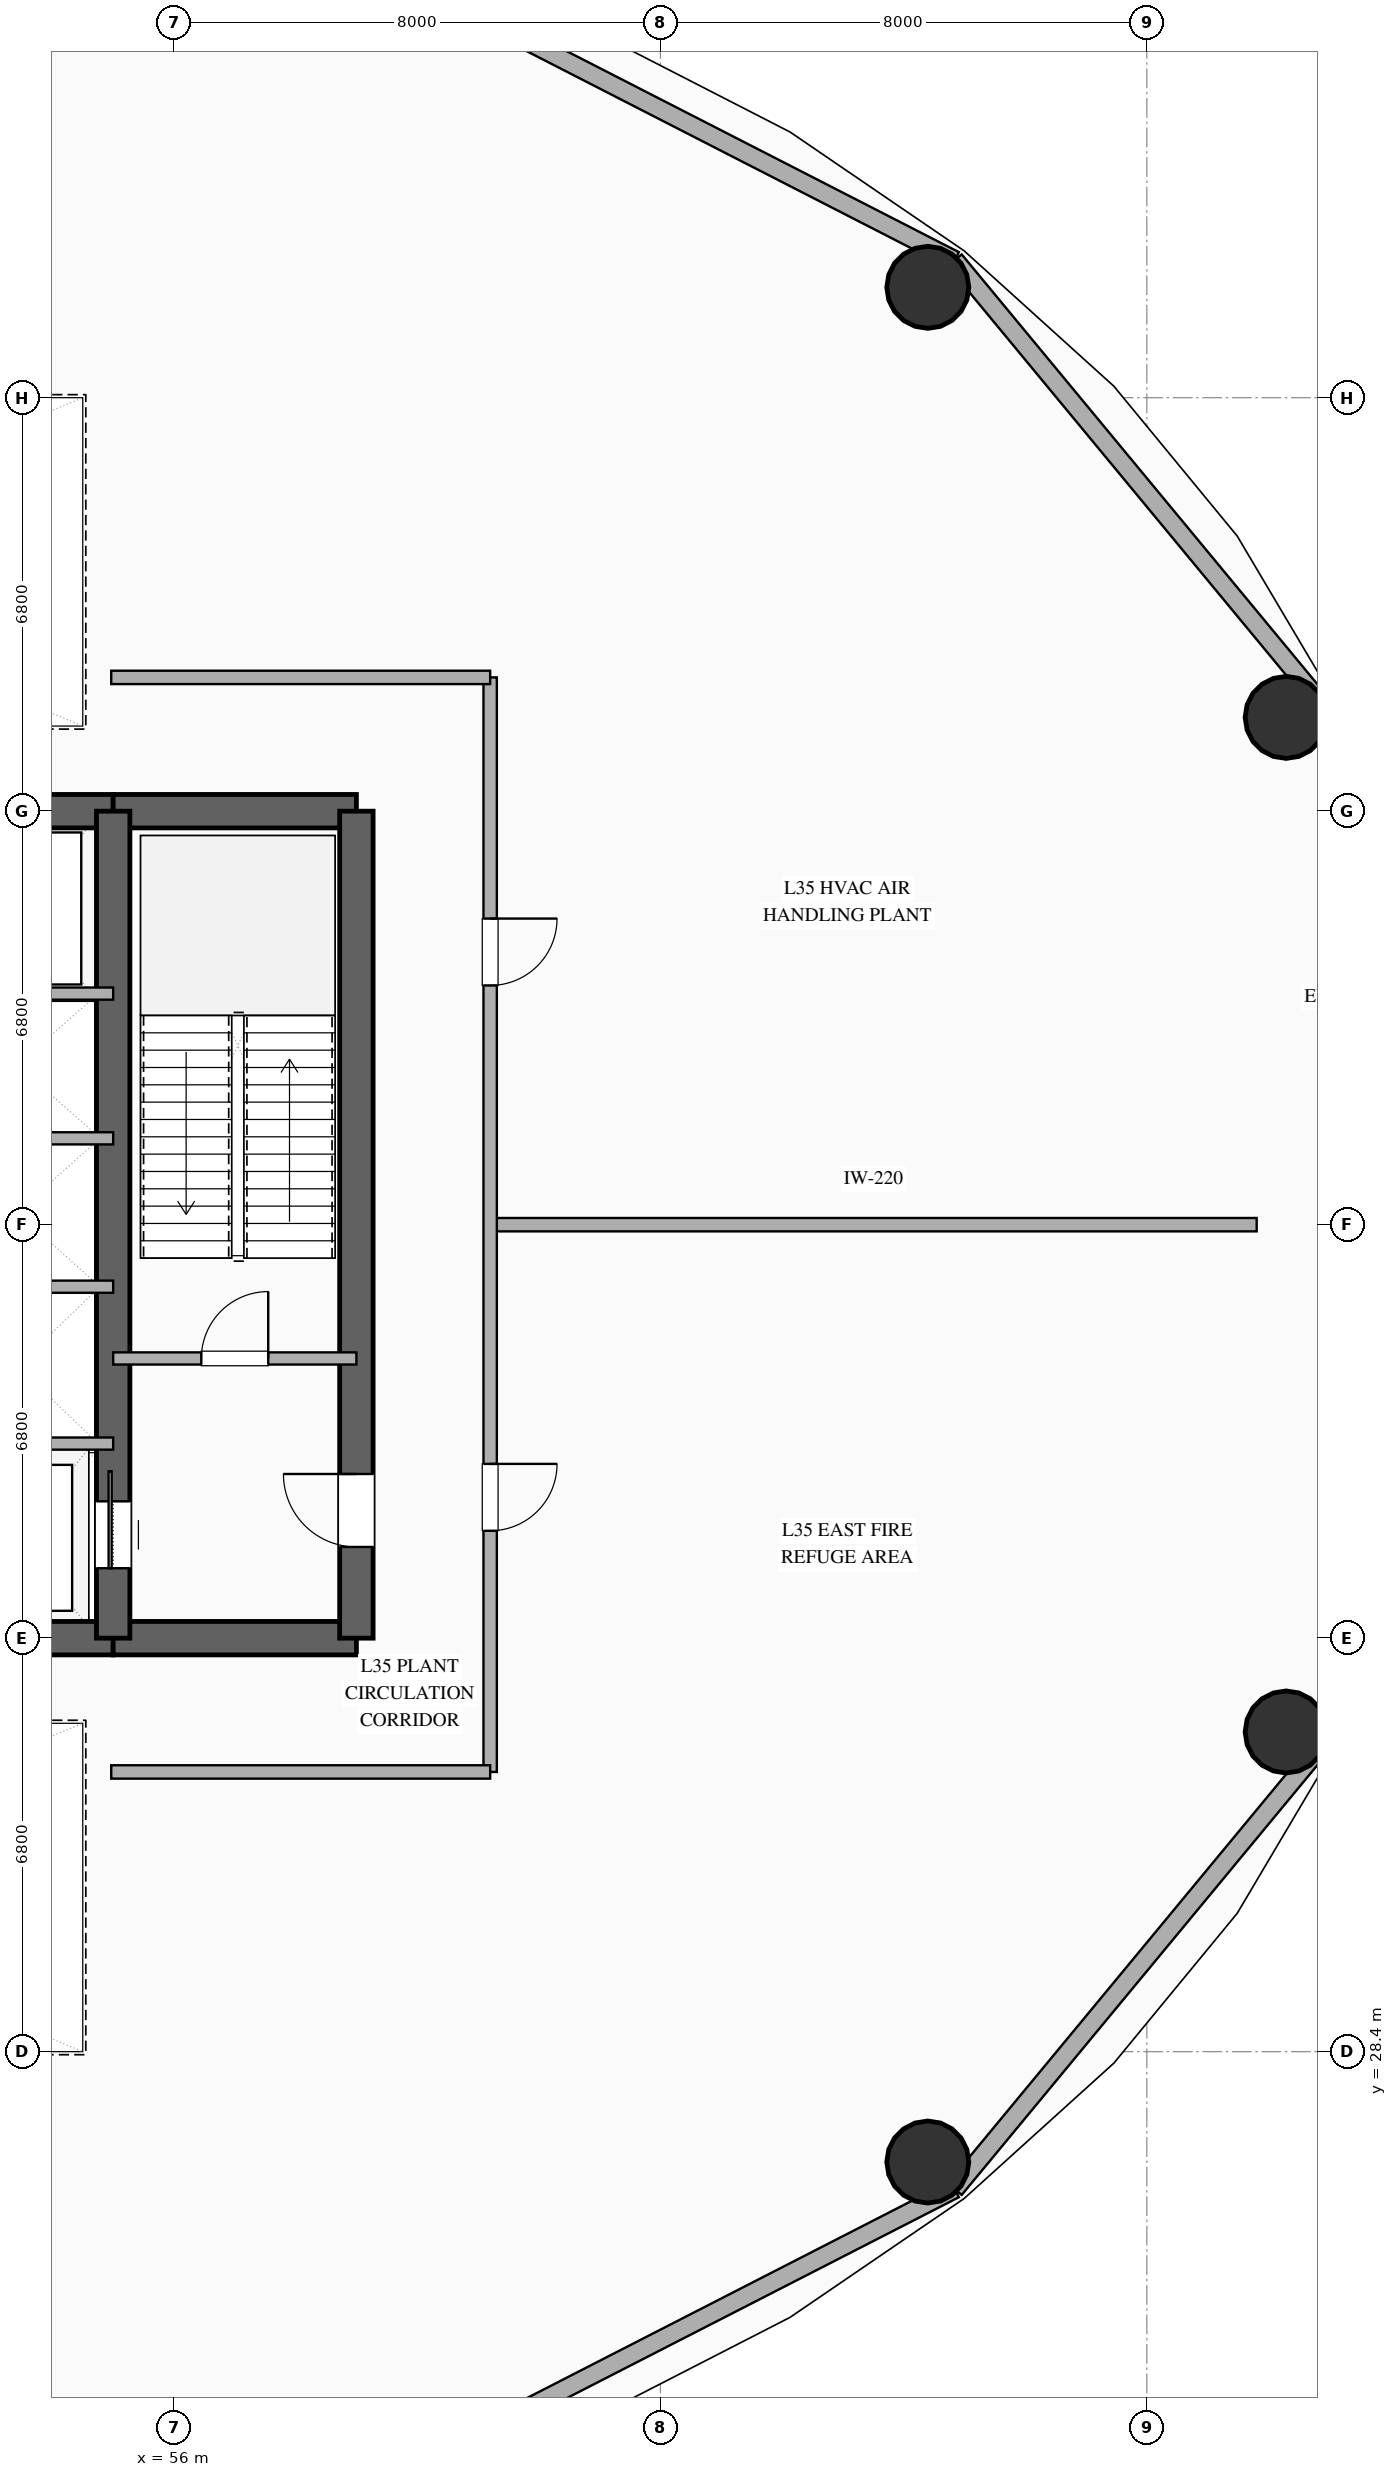
"""IFC4 building model, lengths in metres.
Left out: names, types, materials, properties, quantities, classifications, styles, units other than length and angle.
Written with IfcOpenShell. Run it as: python <this file> out.ifc"""

import sys

from ifc_helpers import new_model, si_unit, direction, frame, frame_2d, origin, origin_2d, place, context, subcontext, project, spatial, rectangle, hollow_circle, extrude, element, fill, save


model = new_model("IFC4")
c1 = context("Model", 3, precision=1e-05, world=origin(), true_north=direction((0.0, 1.0)))
c2 = subcontext(c1, "Body", "Model", "MODEL_VIEW")
j1 = project(units=[si_unit("LENGTHUNIT", "METRE"), si_unit("PLANEANGLEUNIT", "RADIAN")], contexts=[c1])
p1 = place(None, origin())
s1 = spatial("IfcSite", under=j1, at=p1, CompositionType="ELEMENT")
p2 = place(p1, origin())
s2 = spatial("IfcBuilding", under=s1, at=p2, CompositionType="ELEMENT")
p3 = place(p2, frame((0.0, 0.0, 139.8)))
s3 = spatial("IfcBuildingStorey", under=s2, at=p3, CompositionType="ELEMENT", Elevation=139.8)
p4 = place(p3, frame((41.0, 35.2, 0.0), z_axis=(0.0, 0.0, 1.0), x_axis=(1.0, 0.0, 0.0)))
e1 = element("IfcWall", 1, at=p4, inside=s3, PredefinedType="SHEAR", context=c2, shape_type="SweptSolid", body=[
    extrude(rectangle(XDim=14.0, YDim=0.55, at=frame_2d((7.0, 0.0))), origin(), (0.0, 0.0, 1.0), 5.05),
])
p5 = place(p4, frame((6.1, 0.0, 0.0)))
e2 = element("IfcOpeningElement", 2, at=p5, cuts=e1, PredefinedType="OPENING", context=c2, shape_type="SweptSolid", body=[
    extrude(rectangle(XDim=1.8, YDim=2.25, at=frame_2d((0.9, 1.125))), frame((0.0, 0.285, 0.0), z_axis=(0.0, -1.0, 0.0), x_axis=(1.0, 0.0, 0.0)), (0.0, 0.0, 1.0), 0.57),
])
p6 = place(p3, frame((55.0, 35.2, 0.0), z_axis=(0.0, 0.0, 1.0), x_axis=(1.0, 0.0, 0.0)))
e3 = element("IfcWall", 3, at=p6, inside=s3, PredefinedType="SHEAR", context=c2, shape_type="SweptSolid", body=[
    extrude(rectangle(XDim=4.0, YDim=0.55, at=frame_2d((2.0, 0.0))), origin(), (0.0, 0.0, 1.0), 5.05),
])
p7 = place(p3, frame((41.0, 48.8, 0.0), z_axis=(0.0, 0.0, 1.0), x_axis=(1.0, 0.0, 0.0)))
e4 = element("IfcWall", 4, at=p7, inside=s3, PredefinedType="SHEAR", context=c2, shape_type="SweptSolid", body=[
    extrude(rectangle(XDim=14.0, YDim=0.55, at=frame_2d((7.0, 0.0))), origin(), (0.0, 0.0, 1.0), 5.05),
])
p8 = place(p7, frame((6.1, 0.0, 0.0)))
e5 = element("IfcOpeningElement", 5, at=p8, cuts=e4, PredefinedType="OPENING", context=c2, shape_type="SweptSolid", body=[
    extrude(rectangle(XDim=1.8, YDim=2.25, at=frame_2d((0.9, 1.125))), frame((0.0, 0.285, 0.0), z_axis=(0.0, -1.0, 0.0), x_axis=(1.0, 0.0, 0.0)), (0.0, 0.0, 1.0), 0.57),
])
p9 = place(p3, frame((55.0, 48.8, 0.0), z_axis=(0.0, 0.0, 1.0), x_axis=(1.0, 0.0, 0.0)))
e6 = element("IfcWall", 6, at=p9, inside=s3, PredefinedType="SHEAR", context=c2, shape_type="SweptSolid", body=[
    extrude(rectangle(XDim=4.0, YDim=0.55, at=frame_2d((2.0, 0.0))), origin(), (0.0, 0.0, 1.0), 5.05),
])
p10 = place(p3, frame((59.0, 35.2, 0.0), z_axis=(0.0, 0.0, 1.0), x_axis=(0.0, 1.0, 0.0)))
e7 = element("IfcWall", 7, at=p10, inside=s3, PredefinedType="SHEAR", context=c2, shape_type="SweptSolid", body=[
    extrude(rectangle(XDim=13.6, YDim=0.55, at=frame_2d((6.8, 0.0))), origin(), (0.0, 0.0, 1.0), 5.05),
])
p11 = place(p10, frame((1.5, 0.0, 0.0)))
e8 = element("IfcOpeningElement", 8, at=p11, cuts=e7, PredefinedType="OPENING", context=c2, shape_type="SweptSolid", body=[
    extrude(rectangle(XDim=1.2, YDim=2.15, at=frame_2d((0.6, 1.075))), frame((0.0, 0.285, 0.0), z_axis=(0.0, -1.0, 0.0), x_axis=(1.0, 0.0, 0.0)), (0.0, 0.0, 1.0), 0.57),
])
p12 = place(p3, frame((55.0, 35.2, 0.0), z_axis=(0.0, 0.0, 1.0), x_axis=(0.0, 1.0, 0.0)))
e9 = element("IfcWall", 9, at=p12, inside=s3, PredefinedType="SHEAR", context=c2, shape_type="SweptSolid", body=[
    extrude(rectangle(XDim=13.6, YDim=0.55, at=frame_2d((6.8, 0.0))), origin(), (0.0, 0.0, 1.0), 5.05),
])
p13 = place(p12, frame((1.15, 0.0, 0.0)))
e10 = element("IfcOpeningElement", 10, at=p13, cuts=e9, PredefinedType="OPENING", context=c2, shape_type="SweptSolid", body=[
    extrude(rectangle(XDim=1.1, YDim=2.2, at=frame_2d((0.55, 1.1))), frame((0.0, 0.285, 0.0), z_axis=(0.0, -1.0, 0.0), x_axis=(1.0, 0.0, 0.0)), (0.0, 0.0, 1.0), 0.57),
])
for number, where, z_axis, x_axis in (
    (11, (74.291, 50.343, 0.0), (0.0, 0.0, 1.0), (1.0, 0.0, 0.0)),
    (12, (68.398, 57.415, 0.0), (0.0, 0.0, 1.0), (1.0, 0.0, 0.0)),
    (13, (68.398, 26.585, 0.0), (0.0, 0.0, 1.0), (1.0, 0.0, 0.0)),
    (14, (74.291, 33.657, 0.0), (0.0, 0.0, 1.0), (1.0, 0.0, 0.0)),
):
    element("IfcColumn", number, at=place(p3, frame(where, z_axis=z_axis, x_axis=x_axis)), inside=s3, PredefinedType="COLUMN", context=c2, shape_type="SweptSolid", body=[
        extrude(hollow_circle(Radius=0.675, WallThickness=0.036, at=origin_2d()), origin(), (0.0, 0.0, 1.0), 5.05),
    ])
p14 = place(p3, frame((76.849, 42.0, 0.0), z_axis=(0.0, 0.0, 1.0), x_axis=(-0.22558597182, 0.974223264616, 0.0)))
e15 = element("IfcWall", 15, at=p14, inside=s3, PredefinedType="SOLIDWALL", context=c2, shape_type="SweptSolid", body=[
    extrude(rectangle(XDim=8.811, YDim=0.3, at=frame_2d((4.405, 0.0))), origin(), (0.0, 0.0, 1.0), 5.05),
])
p15 = place(p3, frame((74.861, 50.583, 0.0), z_axis=(0.0, 0.0, 1.0), x_axis=(-0.637505817448, 0.770445541696, 0.0)))
e16 = element("IfcWall", 16, at=p15, inside=s3, PredefinedType="SOLIDWALL", context=c2, shape_type="SweptSolid", body=[
    extrude(rectangle(XDim=9.445, YDim=0.3, at=frame_2d((4.723, 0.0))), origin(), (0.0, 0.0, 1.0), 5.05),
])
for number, where, z_axis, x_axis in (
    (17, (68.84, 57.86, 0.0), (0.0, 0.0, 1.0), (-0.89, 0.456, 0.0)),
    (18, (59.351, 21.277, 0.0), (0.0, 0.0, 1.0), (0.89, 0.456, 0.0)),
):
    element("IfcWall", number, at=place(p3, frame(where, z_axis=z_axis, x_axis=x_axis)), inside=s3, PredefinedType="SOLIDWALL", context=c2, shape_type="SweptSolid", body=[
        extrude(rectangle(XDim=10.662, YDim=0.3, at=frame_2d((5.331, 0.0))), origin(), (0.0, 0.0, 1.0), 5.05),
    ])
p16 = place(p3, frame((68.84, 26.14, 0.0), z_axis=(0.0, 0.0, 1.0), x_axis=(0.637505817448, 0.770445541696, 0.0)))
e19 = element("IfcWall", 19, at=p16, inside=s3, PredefinedType="SOLIDWALL", context=c2, shape_type="SweptSolid", body=[
    extrude(rectangle(XDim=9.445, YDim=0.3, at=frame_2d((4.723, 0.0))), origin(), (0.0, 0.0, 1.0), 5.05),
])
p17 = place(p3, frame((74.861, 33.417, 0.0), z_axis=(0.0, 0.0, 1.0), x_axis=(0.22558597182, 0.974223264616, 0.0)))
e20 = element("IfcWall", 20, at=p17, inside=s3, PredefinedType="SOLIDWALL", context=c2, shape_type="SweptSolid", body=[
    extrude(rectangle(XDim=8.811, YDim=0.3, at=frame_2d((4.405, 0.0))), origin(), (0.0, 0.0, 1.0), 5.05),
])
p18 = place(p3, frame((55.0, 39.8, 0.0), z_axis=(0.0, 0.0, 1.0), x_axis=(1.0, 0.0, 0.0)))
e21 = element("IfcWall", 21, at=p18, inside=s3, PredefinedType="SOLIDWALL", context=c2, shape_type="SweptSolid", body=[
    extrude(rectangle(XDim=4.0, YDim=0.2, at=frame_2d((2.0, 0.0))), origin(), (0.0, 0.0, 1.0), 3.35),
])
p19 = place(p18, frame((1.45, 0.0, 0.0)))
e22 = element("IfcOpeningElement", 22, at=p19, cuts=e21, PredefinedType="OPENING", context=c2, shape_type="SweptSolid", body=[
    extrude(rectangle(XDim=1.1, YDim=2.15, at=frame_2d((0.55, 1.075))), frame((0.0, 0.11, 0.0), z_axis=(0.0, -1.0, 0.0), x_axis=(1.0, 0.0, 0.0)), (0.0, 0.0, 1.0), 0.22),
])
for number, where, z_axis, x_axis in (
    (23, (52.05, 38.4, 0.0), (0.0, 0.0, 1.0), (1.0, 0.0, 0.0)),
    (24, (52.05, 40.98, 0.0), (0.0, 0.0, 1.0), (1.0, 0.0, 0.0)),
    (25, (52.05, 43.42, 0.0), (0.0, 0.0, 1.0), (1.0, 0.0, 0.0)),
    (26, (52.05, 45.8, 0.0), (0.0, 0.0, 1.0), (1.0, 0.0, 0.0)),
):
    element("IfcWall", number, at=place(p3, frame(where, z_axis=z_axis, x_axis=x_axis)), inside=s3, PredefinedType="SOLIDWALL", context=c2, shape_type="SweptSolid", body=[
        extrude(rectangle(XDim=2.95, YDim=0.2, at=frame_2d((1.475, 0.0))), origin(), (0.0, 0.0, 1.0), 3.35),
    ])
p20 = place(p3, frame((61.2, 42.0, 0.0), z_axis=(0.0, 0.0, 1.0), x_axis=(1.0, 0.0, 0.0)))
e27 = element("IfcWall", 27, at=p20, inside=s3, PredefinedType="SOLIDWALL", context=c2, shape_type="SweptSolid", body=[
    extrude(rectangle(XDim=12.607, YDim=0.22, at=frame_2d((6.303, 0.0))), origin(), (0.0, 0.0, 1.0), 3.35),
])
p21 = place(p3, frame((61.2, 51.0, 0.0), z_axis=(0.0, 0.0, 1.0), x_axis=(0.0, -1.0, 0.0)))
e28 = element("IfcWall", 28, at=p21, inside=s3, PredefinedType="SOLIDWALL", context=c2, shape_type="SweptSolid", body=[
    extrude(rectangle(XDim=18.0, YDim=0.22, at=frame_2d((9.0, 0.0))), origin(), (0.0, 0.0, 1.0), 3.35),
])
p22 = place(p21, frame((12.934, 0.0, 0.0)))
e29 = element("IfcOpeningElement", 29, at=p22, cuts=e28, PredefinedType="OPENING", context=c2, shape_type="SweptSolid", body=[
    extrude(rectangle(XDim=1.1, YDim=2.15, at=frame_2d((0.55, 1.075))), frame((0.0, 0.12, 0.0), z_axis=(0.0, -1.0, 0.0), x_axis=(1.0, 0.0, 0.0)), (0.0, 0.0, 1.0), 0.24),
])
p23 = place(p21, frame((3.966, 0.0, 0.0)))
e30 = element("IfcOpeningElement", 30, at=p23, cuts=e28, PredefinedType="OPENING", context=c2, shape_type="SweptSolid", body=[
    extrude(rectangle(XDim=1.1, YDim=2.15, at=frame_2d((0.55, 1.075))), frame((0.0, 0.12, 0.0), z_axis=(0.0, -1.0, 0.0), x_axis=(1.0, 0.0, 0.0)), (0.0, 0.0, 1.0), 0.24),
])
for number, where, z_axis, x_axis in (
    (31, (61.2, 33.0, 0.0), (0.0, 0.0, 1.0), (-1.0, 0.0, 0.0)),
    (32, (54.968, 51.0, 0.0), (0.0, 0.0, 1.0), (1.0, 0.0, 0.0)),
):
    element("IfcWall", number, at=place(p3, frame(where, z_axis=z_axis, x_axis=x_axis)), inside=s3, PredefinedType="SOLIDWALL", context=c2, shape_type="SweptSolid", body=[
        extrude(rectangle(XDim=6.232, YDim=0.22, at=frame_2d((3.116, 0.0))), origin(), (0.0, 0.0, 1.0), 3.35),
    ])
p24 = place(p13, origin())
e33 = element("IfcDoor", 33, at=p24, inside=s3, OperationType="SLIDING_TO_RIGHT", PredefinedType="DOOR", context=c2, shape_type="SweptSolid", body=[
    extrude(rectangle(XDim=1.1, YDim=2.2, at=frame_2d((0.55, 1.1))), frame((0.0, 0.025, 0.0), z_axis=(0.0, -1.0, 0.0), x_axis=(1.0, 0.0, 0.0)), (0.0, 0.0, 1.0), 0.05),
])
fill(e10, e33)
p25 = place(p11, origin())
e34 = element("IfcDoor", 34, at=p25, inside=s3, OperationType="SINGLE_SWING_RIGHT", PredefinedType="DOOR", context=c2, shape_type="SweptSolid", body=[
    extrude(rectangle(XDim=1.2, YDim=2.15, at=frame_2d((0.6, 1.075))), frame((0.0, 0.025, 0.0), z_axis=(0.0, -1.0, 0.0), x_axis=(1.0, 0.0, 0.0)), (0.0, 0.0, 1.0), 0.05),
])
fill(e8, e34)
p26 = place(p19, origin())
e35 = element("IfcDoor", 35, at=p26, inside=s3, OperationType="SINGLE_SWING_RIGHT", PredefinedType="DOOR", context=c2, shape_type="SweptSolid", body=[
    extrude(rectangle(XDim=1.1, YDim=2.15, at=frame_2d((0.55, 1.075))), frame((0.0, 0.025, 0.0), z_axis=(0.0, -1.0, 0.0), x_axis=(1.0, 0.0, 0.0)), (0.0, 0.0, 1.0), 0.05),
])
fill(e22, e35)
p27 = place(p22, origin())
e36 = element("IfcDoor", 36, at=p27, inside=s3, OperationType="SINGLE_SWING_LEFT", PredefinedType="DOOR", context=c2, shape_type="SweptSolid", body=[
    extrude(rectangle(XDim=1.1, YDim=2.15, at=frame_2d((0.55, 1.075))), frame((0.0, 0.025, 0.0), z_axis=(0.0, -1.0, 0.0), x_axis=(1.0, 0.0, 0.0)), (0.0, 0.0, 1.0), 0.05),
])
fill(e29, e36)
p28 = place(p23, origin())
e37 = element("IfcDoor", 37, at=p28, inside=s3, OperationType="SINGLE_SWING_LEFT", PredefinedType="DOOR", context=c2, shape_type="SweptSolid", body=[
    extrude(rectangle(XDim=1.1, YDim=2.15, at=frame_2d((0.55, 1.075))), frame((0.0, 0.025, 0.0), z_axis=(0.0, -1.0, 0.0), x_axis=(1.0, 0.0, 0.0)), (0.0, 0.0, 1.0), 0.05),
])
fill(e30, e37)
save(model, sys.argv[1])
